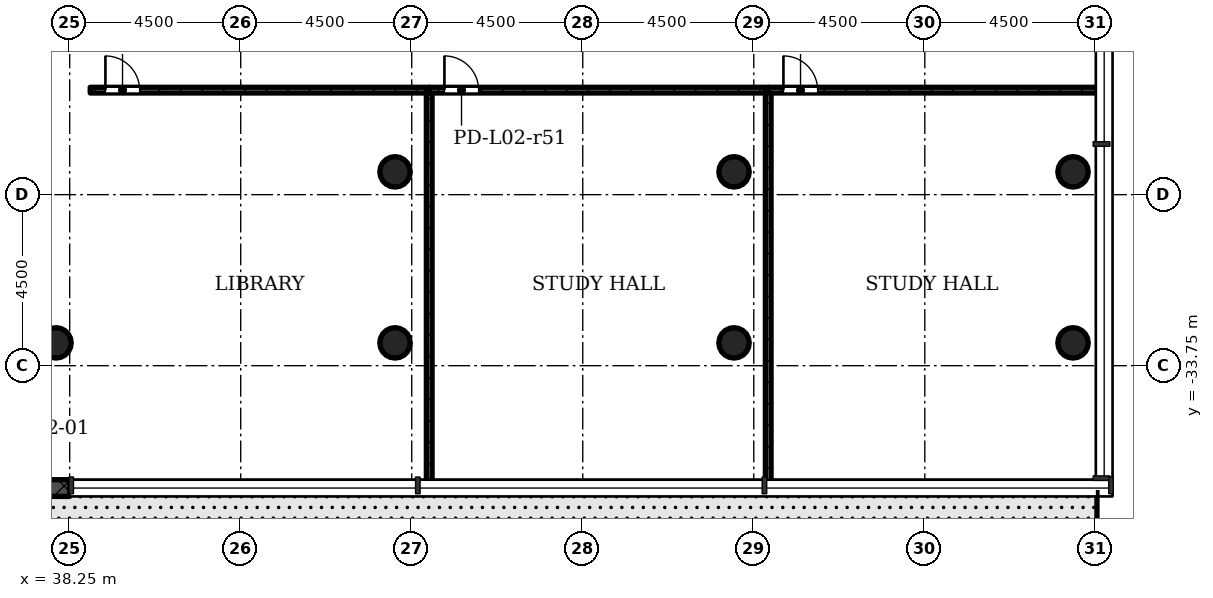
"""IFC4 building model, lengths in metres.
Left out: names, types, materials, properties, quantities, classifications, styles, units other than length and angle.
Written with IfcOpenShell. Run it as: python <this file> out.ifc"""

import sys

from ifc_helpers import new_model, si_unit, direction, frame, frame_2d, origin, origin_2d, place, context, subcontext, project, spatial, rectangle, hollow_circle, extrude, element, fill, save


model = new_model("IFC4")
c1 = context("Model", 3, precision=1e-05, world=origin(), true_north=direction((0.0, 1.0)))
c2 = subcontext(c1, "Body", "Model", "MODEL_VIEW")
j1 = project(units=[si_unit("LENGTHUNIT", "METRE"), si_unit("PLANEANGLEUNIT", "RADIAN")], contexts=[c1])
p1 = place(None, origin())
s1 = spatial("IfcSite", under=j1, at=p1, CompositionType="ELEMENT")
p2 = place(p1, origin())
s2 = spatial("IfcBuilding", under=s1, at=p2, CompositionType="ELEMENT")
p3 = place(p2, frame((0.0, 0.0, 11.0)))
s3 = spatial("IfcBuildingStorey", under=s2, at=p3, CompositionType="ELEMENT", Elevation=11.0)
for number, where, z_axis, x_axis in (
    (1, (37.89, -33.15, 0.0), (0.0, 0.0, 1.0), (1.0, 0.0, 0.0)),
    (2, (46.81, -33.15, 0.0), (0.0, 0.0, 1.0), (1.0, 0.0, 0.0)),
    (3, (55.73, -33.15, 0.0), (0.0, 0.0, 1.0), (1.0, 0.0, 0.0)),
    (4, (64.65, -33.15, 0.0), (0.0, 0.0, 1.0), (1.0, 0.0, 0.0)),
    (5, (46.81, -28.65, 0.0), (0.0, 0.0, 1.0), (1.0, 0.0, 0.0)),
    (6, (55.73, -28.65, 0.0), (0.0, 0.0, 1.0), (1.0, 0.0, 0.0)),
    (7, (64.65, -28.65, 0.0), (0.0, 0.0, 1.0), (1.0, 0.0, 0.0)),
):
    element("IfcColumn", number, at=place(p3, frame(where, z_axis=z_axis, x_axis=x_axis)), inside=s3, PredefinedType="COLUMN", context=c2, shape_type="SweptSolid", body=[
        extrude(hollow_circle(Radius=0.4, WallThickness=0.028, at=origin_2d()), origin(), (0.0, 0.0, 1.0), 4.5),
    ])
p4 = place(p3, frame((33.75, -36.97, -0.02), z_axis=(0.0, 0.0, 1.0), x_axis=(1.0, 0.0, 0.0)))
e8 = element("IfcWall", 8, at=p4, inside=s3, PredefinedType="STANDARD", context=c2, shape_type="SweptSolid", body=[
    extrude(rectangle(XDim=4.5, YDim=0.44, at=frame_2d((2.25, 0.0))), origin(), (0.0, 0.0, 1.0), 4.22),
])
p5 = place(p4, frame((1.35, 0.0, 0.02)))
e9 = element("IfcOpeningElement", 9, at=p5, cuts=e8, PredefinedType="OPENING", context=c2, shape_type="SweptSolid", body=[
    extrude(rectangle(XDim=1.8, YDim=2.1, at=frame_2d((0.9, 1.05))), frame((0.0, 0.23, 0.0), z_axis=(0.0, -1.0, 0.0), x_axis=(1.0, 0.0, 0.0)), (0.0, 0.0, 1.0), 0.46),
])
p6 = place(p3, frame((38.79, -26.5, 0.0), z_axis=(0.0, 0.0, 1.0), x_axis=(1.0, 0.0, 0.0)))
e10 = element("IfcWall", 10, at=p6, inside=s3, PredefinedType="PARTITIONING", context=c2, shape_type="SweptSolid", body=[
    extrude(rectangle(XDim=8.92, YDim=0.15, at=frame_2d((4.46, 0.0))), origin(), (0.0, 0.0, 1.0), 4.08),
])
p7 = place(p6, frame((0.4, 0.0, 0.0)))
e11 = element("IfcOpeningElement", 11, at=p7, cuts=e10, PredefinedType="OPENING", context=c2, shape_type="SweptSolid", body=[
    extrude(rectangle(XDim=0.9, YDim=2.1, at=frame_2d((0.45, 1.05))), frame((0.0, 0.085, 0.0), z_axis=(0.0, -1.0, 0.0), x_axis=(1.0, 0.0, 0.0)), (0.0, 0.0, 1.0), 0.17),
])
p8 = place(p3, frame((47.71, -26.5, 0.0), z_axis=(0.0, 0.0, 1.0), x_axis=(0.0, -1.0, 0.0)))
e12 = element("IfcWall", 12, at=p8, inside=s3, PredefinedType="PARTITIONING", context=c2, shape_type="SweptSolid", body=[
    extrude(rectangle(XDim=10.35, YDim=0.15, at=frame_2d((5.175, 0.0))), origin(), (0.0, 0.0, 1.0), 4.08),
])
p9 = place(p3, frame((47.71, -26.5, 0.0), z_axis=(0.0, 0.0, 1.0), x_axis=(1.0, 0.0, 0.0)))
e13 = element("IfcWall", 13, at=p9, inside=s3, PredefinedType="PARTITIONING", context=c2, shape_type="SweptSolid", body=[
    extrude(rectangle(XDim=8.92, YDim=0.15, at=frame_2d((4.46, 0.0))), origin(), (0.0, 0.0, 1.0), 4.08),
])
p10 = place(p9, frame((0.4, 0.0, 0.0)))
e14 = element("IfcOpeningElement", 14, at=p10, cuts=e13, PredefinedType="OPENING", context=c2, shape_type="SweptSolid", body=[
    extrude(rectangle(XDim=0.9, YDim=2.1, at=frame_2d((0.45, 1.05))), frame((0.0, 0.085, 0.0), z_axis=(0.0, -1.0, 0.0), x_axis=(1.0, 0.0, 0.0)), (0.0, 0.0, 1.0), 0.17),
])
p11 = place(p3, frame((56.63, -26.5, 0.0), z_axis=(0.0, 0.0, 1.0), x_axis=(0.0, -1.0, 0.0)))
e15 = element("IfcWall", 15, at=p11, inside=s3, PredefinedType="PARTITIONING", context=c2, shape_type="SweptSolid", body=[
    extrude(rectangle(XDim=10.35, YDim=0.15, at=frame_2d((5.175, 0.0))), origin(), (0.0, 0.0, 1.0), 4.08),
])
p12 = place(p3, frame((56.63, -26.5, 0.0), z_axis=(0.0, 0.0, 1.0), x_axis=(1.0, 0.0, 0.0)))
e16 = element("IfcWall", 16, at=p12, inside=s3, PredefinedType="PARTITIONING", context=c2, shape_type="SweptSolid", body=[
    extrude(rectangle(XDim=8.72, YDim=0.15, at=frame_2d((4.36, 0.0))), origin(), (0.0, 0.0, 1.0), 4.08),
])
p13 = place(p12, frame((0.4, 0.0, 0.0)))
e17 = element("IfcOpeningElement", 17, at=p13, cuts=e16, PredefinedType="OPENING", context=c2, shape_type="SweptSolid", body=[
    extrude(rectangle(XDim=0.9, YDim=2.1, at=frame_2d((0.45, 1.05))), frame((0.0, 0.085, 0.0), z_axis=(0.0, -1.0, 0.0), x_axis=(1.0, 0.0, 0.0)), (0.0, 0.0, 1.0), 0.17),
])
p14 = place(p7, origin())
e18 = element("IfcDoor", 18, at=p14, inside=s3, OperationType="SINGLE_SWING_RIGHT", PredefinedType="DOOR", context=c2, shape_type="SweptSolid", body=[
    extrude(rectangle(XDim=0.9, YDim=2.1, at=frame_2d((0.45, 1.05))), frame((0.0, 0.025, 0.0), z_axis=(0.0, -1.0, 0.0), x_axis=(1.0, 0.0, 0.0)), (0.0, 0.0, 1.0), 0.05),
])
fill(e11, e18)
p15 = place(p10, origin())
e19 = element("IfcDoor", 19, at=p15, inside=s3, OperationType="SINGLE_SWING_RIGHT", PredefinedType="DOOR", context=c2, shape_type="SweptSolid", body=[
    extrude(rectangle(XDim=0.9, YDim=2.1, at=frame_2d((0.45, 1.05))), frame((0.0, 0.025, 0.0), z_axis=(0.0, -1.0, 0.0), x_axis=(1.0, 0.0, 0.0)), (0.0, 0.0, 1.0), 0.05),
])
fill(e14, e19)
p16 = place(p13, origin())
e20 = element("IfcDoor", 20, at=p16, inside=s3, OperationType="SINGLE_SWING_RIGHT", PredefinedType="DOOR", context=c2, shape_type="SweptSolid", body=[
    extrude(rectangle(XDim=0.9, YDim=2.1, at=frame_2d((0.45, 1.05))), frame((0.0, 0.025, 0.0), z_axis=(0.0, -1.0, 0.0), x_axis=(1.0, 0.0, 0.0)), (0.0, 0.0, 1.0), 0.05),
])
fill(e17, e20)
save(model, sys.argv[1])
